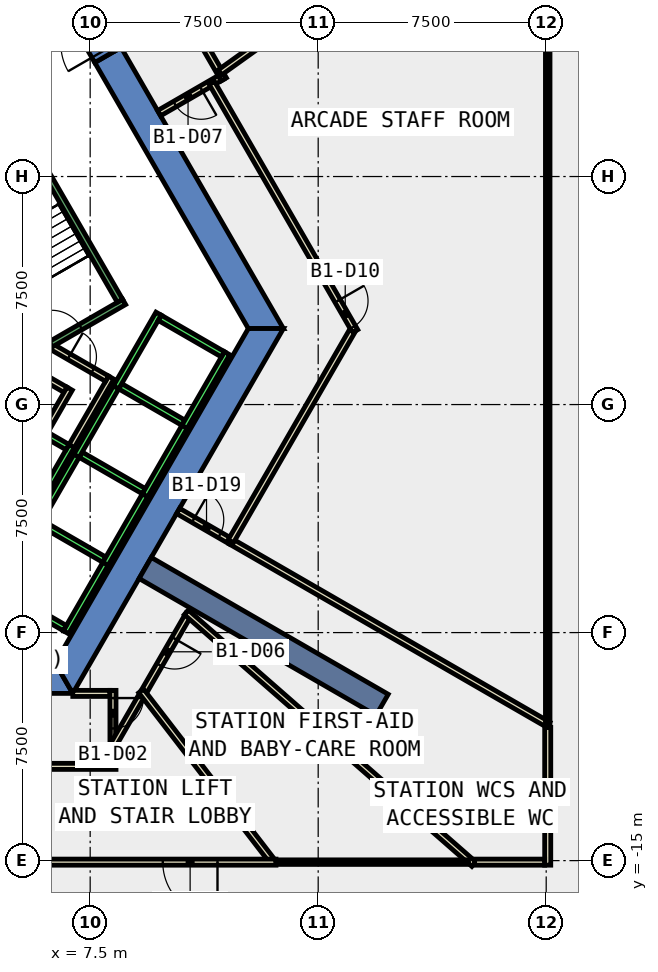
"""IFC4 building model, lengths in metres.
Left out: names, types, materials, properties, quantities, classifications, styles, units other than length and angle.
Written with IfcOpenShell. Run it as: python <this file> out.ifc"""

import sys

from ifc_helpers import new_model, si_unit, direction, frame, frame_2d, origin, place, context, subcontext, project, spatial, polyline, rectangle, outline, extrude, element, fill, save


model = new_model("IFC4")
c1 = context("Model", 3, precision=1e-05, world=origin(), true_north=direction((0.0, 1.0)))
c2 = subcontext(c1, "Body", "Model", "MODEL_VIEW")
j1 = project(units=[si_unit("LENGTHUNIT", "METRE"), si_unit("PLANEANGLEUNIT", "RADIAN")], contexts=[c1])
p1 = place(None, origin())
s1 = spatial("IfcSite", under=j1, at=p1, CompositionType="ELEMENT")
p2 = place(p1, origin())
s2 = spatial("IfcBuilding", under=s1, at=p2, CompositionType="ELEMENT")
p3 = place(p2, frame((0.0, 0.0, -5.5)))
s3 = spatial("IfcBuildingStorey", under=s2, at=p3, CompositionType="ELEMENT", Elevation=-5.5)
p4 = place(p3, frame((0.0, 0.0, -0.42)))
e1 = element("IfcWall", 1, at=p4, inside=s3, PredefinedType="SHEAR", context=c2, shape_type="SweptSolid", body=[
    extrude(outline(polyline([(8.517, 11.748), (7.651, 11.248), (12.702, 2.5), (13.856, 2.5), (8.517, 11.748)])), origin(), (0.0, 0.0, 1.0), 5.42),
])
p5 = place(p3, frame((0.0, 0.0, 3.6)))
e2 = element("IfcWall", 2, at=p5, inside=s3, PredefinedType="SHEAR", context=c2, shape_type="SweptSolid", body=[
    extrude(outline(polyline([(7.517, 13.48), (6.651, 12.98), (7.651, 11.248), (8.517, 11.748), (7.517, 13.48)])), origin(), (0.0, 0.0, 1.0), 1.4),
])
p6 = place(p3, frame((0.0, 0.0, -0.42)))
e3 = element("IfcWall", 3, at=p6, inside=s3, PredefinedType="SHEAR", context=c2, shape_type="SweptSolid", body=[
    extrude(outline(polyline([(5.75, -8.5), (5.75, -9.5), (6.928, -9.5), (6.351, -8.5), (5.75, -8.5)])), origin(), (0.0, 0.0, 1.0), 5.42),
])
p7 = place(p3, frame((0.0, 0.0, -0.42)))
e4 = element("IfcWall", 4, at=p7, inside=s3, PredefinedType="SHEAR", context=c2, shape_type="SweptSolid", body=[
    extrude(outline(polyline([(6.928, -9.5), (13.856, 2.5), (12.702, 2.5), (6.351, -8.5), (6.928, -9.5)])), origin(), (0.0, 0.0, 1.0), 5.42),
])
p8 = place(p3, frame((9.31, -5.375, -0.42), z_axis=(0.0, 0.0, 1.0), x_axis=(0.866017533419, -0.500013631625, 0.0)))
e5 = element("IfcWall", 5, at=p8, inside=s3, PredefinedType="SHEAR", context=c2, shape_type="SweptSolid", body=[
    extrude(rectangle(XDim=9.0, YDim=0.8, at=frame_2d((4.5, 0.0))), origin(), (0.0, 0.0, 1.0), 5.42),
])
p9 = place(p3, frame((6.928, -9.5, 0.0), z_axis=(0.0, 0.0, 1.0), x_axis=(1.0, 0.0, 0.0)))
e6 = element("IfcWall", 6, at=p9, inside=s3, PredefinedType="PARTITIONING", context=c2, shape_type="SweptSolid", body=[
    extrude(rectangle(XDim=1.222, YDim=0.2, at=frame_2d((0.611, 0.0))), origin(), (0.0, 0.0, 1.0), 4.9),
])
p10 = place(p3, frame((8.25, -9.4, 0.0), z_axis=(0.0, 0.0, 1.0), x_axis=(0.0, -1.0, 0.0)))
e7 = element("IfcWall", 7, at=p10, inside=s3, PredefinedType="PARTITIONING", context=c2, shape_type="SweptSolid", body=[
    extrude(rectangle(XDim=1.71, YDim=0.2, at=frame_2d((0.855, 0.0))), origin(), (0.0, 0.0, 1.0), 4.9),
])
p11 = place(p10, frame((0.253, 0.0, 0.0)))
e8 = element("IfcOpeningElement", 8, at=p11, cuts=e7, PredefinedType="OPENING", context=c2, shape_type="SweptSolid", body=[
    extrude(rectangle(XDim=1.0, YDim=2.1, at=frame_2d((0.5, 1.05))), frame((0.0, 0.11, 0.0), z_axis=(0.0, -1.0, 0.0), x_axis=(1.0, 0.0, 0.0)), (0.0, 0.0, 1.0), 0.22),
])
p12 = place(p3, frame((8.35, -11.9, 0.0), z_axis=(0.0, 0.0, 1.0), x_axis=(-1.0, 0.0, 0.0)))
e9 = element("IfcWall", 9, at=p12, inside=s3, PredefinedType="PARTITIONING", context=c2, shape_type="SweptSolid", body=[
    extrude(rectangle(XDim=7.039, YDim=0.2, at=frame_2d((3.52, 0.0))), origin(), (0.0, 0.0, 1.0), 4.9),
])
p13 = place(p12, frame((2.659, 0.0, 0.0)))
e10 = element("IfcOpeningElement", 10, at=p13, cuts=e9, PredefinedType="OPENING", context=c2, shape_type="SweptSolid", body=[
    extrude(rectangle(XDim=1.0, YDim=2.1, at=frame_2d((0.5, 1.05))), frame((0.0, 0.11, 0.0), z_axis=(0.0, -1.0, 0.0), x_axis=(1.0, 0.0, 0.0)), (0.0, 0.0, 1.0), 0.22),
])
p14 = place(p3, frame((8.25, -11.31, 0.0), z_axis=(0.0, 0.0, 1.0), x_axis=(0.0, -1.0, 0.0)))
e11 = element("IfcWall", 11, at=p14, inside=s3, PredefinedType="PARTITIONING", context=c2, shape_type="SweptSolid", body=[
    extrude(rectangle(XDim=0.49, YDim=0.2, at=frame_2d((0.245, 0.0))), origin(), (0.0, 0.0, 1.0), 4.9),
])
p15 = place(p3, frame((9.238, -9.498, 0.0), z_axis=(0.0, 0.0, 1.0), x_axis=(-0.499780113518, -0.866152318089, 0.0)))
e12 = element("IfcWall", 12, at=p15, inside=s3, PredefinedType="PARTITIONING", context=c2, shape_type="SweptSolid", body=[
    extrude(rectangle(XDim=2.077, YDim=0.2, at=frame_2d((1.039, 0.0))), origin(), (0.0, 0.0, 1.0), 4.9),
])
p16 = place(p3, frame((10.738, -6.901, 0.0), z_axis=(0.0, 0.0, 1.0), x_axis=(-0.500131122175, -0.865949687125, 0.0)))
e13 = element("IfcWall", 13, at=p16, inside=s3, PredefinedType="PARTITIONING", context=c2, shape_type="SweptSolid", body=[
    extrude(rectangle(XDim=2.999, YDim=0.2, at=frame_2d((1.5, 0.0))), origin(), (0.0, 0.0, 1.0), 4.9),
])
p17 = place(p16, frame((0.921, 0.0, 0.0)))
e14 = element("IfcOpeningElement", 14, at=p17, cuts=e13, PredefinedType="OPENING", context=c2, shape_type="SweptSolid", body=[
    extrude(rectangle(XDim=1.0, YDim=2.1, at=frame_2d((0.5, 1.05))), frame((0.0, 0.11, 0.0), z_axis=(0.0, -1.0, 0.0), x_axis=(1.0, 0.0, 0.0)), (0.0, 0.0, 1.0), 0.22),
])
p18 = place(p3, frame((9.177, -9.419, 0.0), z_axis=(0.0, 0.0, 1.0), x_axis=(0.610138829962, -0.792294521104, 0.0)))
e15 = element("IfcWall", 15, at=p18, inside=s3, PredefinedType="PARTITIONING", context=c2, shape_type="SweptSolid", body=[
    extrude(rectangle(XDim=7.082, YDim=0.2, at=frame_2d((3.541, 0.0))), origin(), (0.0, 0.0, 1.0), 4.9),
])
p19 = place(p3, frame((13.613, -15.05, 0.0), z_axis=(0.0, 0.0, 1.0), x_axis=(-1.0, 0.0, 0.0)))
e16 = element("IfcWall", 16, at=p19, inside=s3, PredefinedType="PARTITIONING", context=c2, shape_type="SweptSolid", body=[
    extrude(rectangle(XDim=11.994, YDim=0.2, at=frame_2d((5.997, 0.0))), origin(), (0.0, 0.0, 1.0), 4.9),
])
p20 = place(p19, frame((1.925, 0.0, 0.0)))
e17 = element("IfcOpeningElement", 17, at=p20, cuts=e16, PredefinedType="OPENING", context=c2, shape_type="SweptSolid", body=[
    extrude(rectangle(XDim=1.8, YDim=2.1, at=frame_2d((0.9, 1.05))), frame((0.0, 0.11, 0.0), z_axis=(0.0, -1.0, 0.0), x_axis=(1.0, 0.0, 0.0)), (0.0, 0.0, 1.0), 0.22),
])
p21 = place(p3, frame((10.663, -6.835, 0.0), z_axis=(0.0, 0.0, 1.0), x_axis=(0.752369729321, -0.658741064761, 0.0)))
e18 = element("IfcWall", 18, at=p21, inside=s3, PredefinedType="PARTITIONING", context=c2, shape_type="SweptSolid", body=[
    extrude(rectangle(XDim=12.571, YDim=0.2, at=frame_2d((6.286, 0.0))), origin(), (0.0, 0.0, 1.0), 4.9),
])
p22 = place(p3, frame((19.946, -15.05, 0.0), z_axis=(0.0, 0.0, 1.0), x_axis=(-1.0, 0.0, 0.0)))
e19 = element("IfcWall", 19, at=p22, inside=s3, PredefinedType="PARTITIONING", context=c2, shape_type="SweptSolid", body=[
    extrude(rectangle(XDim=6.333, YDim=0.15, at=frame_2d((3.167, 0.0))), origin(), (0.0, 0.0, 1.0), 4.9),
])
p23 = place(p3, frame((10.392, -3.5, 0.0), z_axis=(0.0, 0.0, 1.0), x_axis=(0.866010750942, -0.50002537861, 0.0)))
e20 = element("IfcWall", 20, at=p23, inside=s3, PredefinedType="PARTITIONING", context=c2, shape_type="SweptSolid", body=[
    extrude(rectangle(XDim=2.0, YDim=0.2, at=frame_2d((1.0, 0.0))), origin(), (0.0, 0.0, 1.0), 4.9),
])
p24 = place(p23, frame((0.58, 0.0, 0.0)))
e21 = element("IfcOpeningElement", 21, at=p24, cuts=e20, PredefinedType="OPENING", context=c2, shape_type="SweptSolid", body=[
    extrude(rectangle(XDim=1.0, YDim=2.1, at=frame_2d((0.5, 1.05))), frame((0.0, 0.11, 0.0), z_axis=(0.0, -1.0, 0.0), x_axis=(1.0, 0.0, 0.0)), (0.0, 0.0, 1.0), 0.22),
])
p25 = place(p3, frame((12.124, -4.5, 0.0), z_axis=(0.0, 0.0, 1.0), x_axis=(0.866066629319, -0.499928588481, 0.0)))
e22 = element("IfcWall", 22, at=p25, inside=s3, PredefinedType="PARTITIONING", context=c2, shape_type="SweptSolid", body=[
    extrude(rectangle(XDim=12.064, YDim=0.2, at=frame_2d((6.032, 0.0))), origin(), (0.0, 0.0, 1.0), 4.9),
])
p26 = place(p3, frame((22.55, -10.619, 0.0), z_axis=(0.0, 0.0, 1.0), x_axis=(0.0, -1.0, 0.0)))
e23 = element("IfcWall", 23, at=p26, inside=s3, PredefinedType="PARTITIONING", context=c2, shape_type="SweptSolid", body=[
    extrude(rectangle(XDim=4.531, YDim=0.2, at=frame_2d((2.266, 0.0))), origin(), (0.0, 0.0, 1.0), 4.9),
])
p27 = place(p3, frame((22.45, -15.05, 0.0), z_axis=(0.0, 0.0, 1.0), x_axis=(-1.0, 0.0, 0.0)))
e24 = element("IfcWall", 24, at=p27, inside=s3, PredefinedType="PARTITIONING", context=c2, shape_type="SweptSolid", body=[
    extrude(rectangle(XDim=2.304, YDim=0.2, at=frame_2d((1.152, 0.0))), origin(), (0.0, 0.0, 1.0), 4.9),
])
p28 = place(p3, frame((11.845, 10.783, 0.0), z_axis=(0.0, 0.0, 1.0), x_axis=(-0.865973769406, -0.500089422704, 0.0)))
e25 = element("IfcWall", 25, at=p28, inside=s3, PredefinedType="PARTITIONING", context=c2, shape_type="SweptSolid", body=[
    extrude(rectangle(XDim=2.399, YDim=0.2, at=frame_2d((1.2, 0.0))), origin(), (0.0, 0.0, 1.0), 4.9),
])
p29 = place(p28, frame((0.8, 0.0, 0.0)))
e26 = element("IfcOpeningElement", 26, at=p29, cuts=e25, PredefinedType="OPENING", context=c2, shape_type="SweptSolid", body=[
    extrude(rectangle(XDim=1.0, YDim=2.1, at=frame_2d((0.5, 1.05))), frame((0.0, 0.11, 0.0), z_axis=(0.0, -1.0, 0.0), x_axis=(1.0, 0.0, 0.0)), (0.0, 0.0, 1.0), 0.22),
])
p30 = place(p3, frame((8.295, 16.932, 0.0), z_axis=(0.0, 0.0, 1.0), x_axis=(0.499982693035, -0.866035395735, 0.0)))
e27 = element("IfcWall", 27, at=p30, inside=s3, PredefinedType="PARTITIONING", context=c2, shape_type="SweptSolid", body=[
    extrude(rectangle(XDim=7.2, YDim=0.2, at=frame_2d((3.6, 0.0))), origin(), (0.0, 0.0, 1.0), 4.9),
])
p31 = place(p30, frame((2.659, 0.0, 0.0)))
e28 = element("IfcOpeningElement", 28, at=p31, cuts=e27, PredefinedType="OPENING", context=c2, shape_type="SweptSolid", body=[
    extrude(rectangle(XDim=1.0, YDim=2.1, at=frame_2d((0.5, 1.05))), frame((0.0, 0.11, 0.0), z_axis=(0.0, -1.0, 0.0), x_axis=(1.0, 0.0, 0.0)), (0.0, 0.0, 1.0), 0.22),
])
p32 = place(p3, frame((11.499, 10.583, 0.0), z_axis=(0.0, 0.0, 1.0), x_axis=(0.499933044277, -0.866064057238, 0.0)))
e29 = element("IfcWall", 29, at=p32, inside=s3, PredefinedType="PARTITIONING", context=c2, shape_type="SweptSolid", body=[
    extrude(rectangle(XDim=9.433, YDim=0.2, at=frame_2d((4.717, 0.0))), origin(), (0.0, 0.0, 1.0), 4.9),
])
p33 = place(p32, frame((8.283, 0.0, 0.0)))
e30 = element("IfcOpeningElement", 30, at=p33, cuts=e29, PredefinedType="OPENING", context=c2, shape_type="SweptSolid", body=[
    extrude(rectangle(XDim=1.0, YDim=2.1, at=frame_2d((0.5, 1.05))), frame((0.0, 0.11, 0.0), z_axis=(0.0, -1.0, 0.0), x_axis=(1.0, 0.0, 0.0)), (0.0, 0.0, 1.0), 0.22),
])
p34 = place(p3, frame((16.115, 2.413, 0.0), z_axis=(0.0, 0.0, 1.0), x_axis=(-0.499971321283, -0.866041960816, 0.0)))
e31 = element("IfcWall", 31, at=p34, inside=s3, PredefinedType="PARTITIONING", context=c2, shape_type="SweptSolid", body=[
    extrude(rectangle(XDim=7.982, YDim=0.2, at=frame_2d((3.991, 0.0))), origin(), (0.0, 0.0, 1.0), 4.9),
])
p35 = place(p3, frame((22.57, 18.658, 0.0), z_axis=(0.0, 0.0, 1.0), x_axis=(-0.813097421088, -0.582127635334, 0.0)))
e32 = element("IfcWall", 32, at=p35, inside=s3, PredefinedType="PARTITIONING", context=c2, shape_type="SweptSolid", body=[
    extrude(rectangle(XDim=13.289, YDim=0.2, at=frame_2d((6.645, 0.0))), origin(), (0.0, 0.0, 1.0), 4.9),
])
p36 = place(p3, frame((22.55, 18.743, 0.0), z_axis=(0.0, 0.0, 1.0), x_axis=(0.0, -1.0, 0.0)))
e33 = element("IfcWall", 33, at=p36, inside=s3, PredefinedType="PARTITIONING", context=c2, shape_type="SweptSolid", body=[
    extrude(rectangle(XDim=29.362, YDim=0.15, at=frame_2d((14.681, 0.0))), origin(), (0.0, 0.0, 1.0), 4.9),
])
p37 = place(p3, frame((5.499, 1.172, 0.0), z_axis=(0.0, 0.0, 1.0), x_axis=(0.866333505267, -0.499465972466, 0.0)))
e34 = element("IfcWall", 34, at=p37, inside=s3, PredefinedType="PARTITIONING", context=c2, shape_type="SweptSolid", body=[
    extrude(rectangle(XDim=1.374, YDim=0.2, at=frame_2d((0.687, 0.0))), origin(), (0.0, 0.0, 1.0), 4.9),
])
p38 = place(p3, frame((6.826, 0.522, 0.0), z_axis=(0.0, 0.0, 1.0), x_axis=(-0.500016722714, -0.866015748706, 0.0)))
e35 = element("IfcWall", 35, at=p38, inside=s3, PredefinedType="PARTITIONING", context=c2, shape_type="SweptSolid", body=[
    extrude(rectangle(XDim=1.7, YDim=0.2, at=frame_2d((0.85, 0.0))), origin(), (0.0, 0.0, 1.0), 4.9),
])
p39 = place(p3, frame((8.192, 0.888, 0.0), z_axis=(0.0, 0.0, 1.0), x_axis=(-0.499940625693, -0.866059680843, 0.0)))
e36 = element("IfcWall", 36, at=p39, inside=s3, PredefinedType="PARTITIONING", context=c2, shape_type="SweptSolid", body=[
    extrude(rectangle(XDim=2.68, YDim=0.2, at=frame_2d((1.34, 0.0))), origin(), (0.0, 0.0, 1.0), 4.9),
])
p40 = place(p3, frame((6.25, 1.894, 0.0), z_axis=(0.0, 0.0, 1.0), x_axis=(0.866043184279, -0.499969202016, 0.0)))
e37 = element("IfcWall", 37, at=p40, inside=s3, PredefinedType="PARTITIONING", context=c2, shape_type="SweptSolid", body=[
    extrude(rectangle(XDim=2.084, YDim=0.2, at=frame_2d((1.042, 0.0))), origin(), (0.0, 0.0, 1.0), 4.9),
])
p41 = place(p40, frame((0.642, 0.0, 0.0)))
e38 = element("IfcOpeningElement", 38, at=p41, cuts=e37, PredefinedType="OPENING", context=c2, shape_type="SweptSolid", body=[
    extrude(rectangle(XDim=0.9, YDim=2.1, at=frame_2d((0.45, 1.05))), frame((0.0, 0.11, 0.0), z_axis=(0.0, -1.0, 0.0), x_axis=(1.0, 0.0, 0.0)), (0.0, 0.0, 1.0), 0.22),
])
p42 = place(p3, frame((5.492, -3.788, 0.0), z_axis=(0.0, 0.0, 1.0), x_axis=(0.500011755427, 0.866018616679, 0.0)))
e39 = element("IfcWall", 39, at=p42, inside=s3, PredefinedType="STANDARD", context=c2, shape_type="SweptSolid", body=[
    extrude(rectangle(XDim=2.8, YDim=0.2, at=frame_2d((1.4, 0.0))), origin(), (0.0, 0.0, 1.0), 4.9),
])
p43 = place(p3, frame((4.677, -0.2, 0.0), z_axis=(0.0, 0.0, 1.0), x_axis=(0.865973769406, -0.500089422704, 0.0)))
e40 = element("IfcWall", 40, at=p43, inside=s3, PredefinedType="STANDARD", context=c2, shape_type="SweptSolid", body=[
    extrude(rectangle(XDim=2.399, YDim=0.2, at=frame_2d((1.2, 0.0))), origin(), (0.0, 0.0, 1.0), 4.9),
])
p44 = place(p3, frame((6.703, -7.49, 0.0), z_axis=(0.0, 0.0, 1.0), x_axis=(0.500011755427, 0.866018616679, 0.0)))
e41 = element("IfcWall", 41, at=p44, inside=s3, PredefinedType="STANDARD", context=c2, shape_type="SweptSolid", body=[
    extrude(rectangle(XDim=2.8, YDim=0.2, at=frame_2d((1.4, 0.0))), origin(), (0.0, 0.0, 1.0), 3.6),
])
for number, where, z_axis, x_axis in (
    (42, (4.588, -6.153, 0.0), (0.0, 0.0, 1.0), (0.866, -0.5, 0.0)),
    (43, (5.888, -3.902, 0.0), (0.0, 0.0, 1.0), (0.866, -0.5, 0.0)),
):
    element("IfcWall", number, at=place(p3, frame(where, z_axis=z_axis, x_axis=x_axis)), inside=s3, PredefinedType="STANDARD", context=c2, shape_type="SweptSolid", body=[
        extrude(rectangle(XDim=2.4, YDim=0.2, at=frame_2d((1.2, 0.0))), origin(), (0.0, 0.0, 1.0), 3.6),
    ])
p45 = place(p3, frame((5.751, -3.938, 0.0), z_axis=(0.0, 0.0, 1.0), x_axis=(0.49994636267, 0.866056369097, 0.0)))
e44 = element("IfcWall", 44, at=p45, inside=s3, PredefinedType="STANDARD", context=c2, shape_type="SweptSolid", body=[
    extrude(rectangle(XDim=2.8, YDim=0.2, at=frame_2d((1.4, 0.0))), origin(), (0.0, 0.0, 1.0), 3.6),
])
p46 = place(p3, frame((8.003, -5.238, 0.0), z_axis=(0.0, 0.0, 1.0), x_axis=(0.500011755427, 0.866018616679, 0.0)))
e45 = element("IfcWall", 45, at=p46, inside=s3, PredefinedType="STANDARD", context=c2, shape_type="SweptSolid", body=[
    extrude(rectangle(XDim=2.8, YDim=0.2, at=frame_2d((1.4, 0.0))), origin(), (0.0, 0.0, 1.0), 3.6),
])
p47 = place(p3, frame((7.188, -1.65, 0.0), z_axis=(0.0, 0.0, 1.0), x_axis=(0.865955154139, -0.50012165622, 0.0)))
e46 = element("IfcWall", 46, at=p47, inside=s3, PredefinedType="STANDARD", context=c2, shape_type="SweptSolid", body=[
    extrude(rectangle(XDim=2.4, YDim=0.2, at=frame_2d((1.2, 0.0))), origin(), (0.0, 0.0, 1.0), 3.6),
])
for number, where, z_axis, x_axis in (
    (47, (7.051, -1.687, 0.0), (0.0, 0.0, 1.0), (0.5, 0.866, 0.0)),
    (48, (9.303, -2.987, 0.0), (0.0, 0.0, 1.0), (0.5, 0.866, 0.0)),
):
    element("IfcWall", number, at=place(p3, frame(where, z_axis=z_axis, x_axis=x_axis)), inside=s3, PredefinedType="STANDARD", context=c2, shape_type="SweptSolid", body=[
        extrude(rectangle(XDim=2.8, YDim=0.2, at=frame_2d((1.4, 0.0))), origin(), (0.0, 0.0, 1.0), 3.6),
    ])
p48 = place(p3, frame((8.488, 0.602, 0.0), z_axis=(0.0, 0.0, 1.0), x_axis=(0.865973769406, -0.500089422704, 0.0)))
e49 = element("IfcWall", 49, at=p48, inside=s3, PredefinedType="STANDARD", context=c2, shape_type="SweptSolid", body=[
    extrude(rectangle(XDim=2.399, YDim=0.2, at=frame_2d((1.2, 0.0))), origin(), (0.0, 0.0, 1.0), 3.6),
])
for number, where, z_axis, x_axis in (
    (50, (8.351, 0.565, 0.0), (0.0, 0.0, 1.0), (0.5, 0.866, 0.0)),
    (51, (10.603, -0.735, 0.0), (0.0, 0.0, 1.0), (0.5, 0.866, 0.0)),
):
    element("IfcWall", number, at=place(p3, frame(where, z_axis=z_axis, x_axis=x_axis)), inside=s3, PredefinedType="STANDARD", context=c2, shape_type="SweptSolid", body=[
        extrude(rectangle(XDim=2.8, YDim=0.2, at=frame_2d((1.4, 0.0))), origin(), (0.0, 0.0, 1.0), 3.6),
    ])
p49 = place(p3, frame((9.788, 2.853, 0.0), z_axis=(0.0, 0.0, 1.0), x_axis=(0.865973769406, -0.500089422704, 0.0)))
e52 = element("IfcWall", 52, at=p49, inside=s3, PredefinedType="STANDARD", context=c2, shape_type="SweptSolid", body=[
    extrude(rectangle(XDim=2.399, YDim=0.2, at=frame_2d((1.2, 0.0))), origin(), (0.0, 0.0, 1.0), 3.6),
])
p50 = place(p3, frame((4.806, 1.176, 0.0), z_axis=(0.0, 0.0, 1.0), x_axis=(0.866059941101, 0.499940174841, 0.0)))
e53 = element("IfcWall", 53, at=p50, inside=s3, PredefinedType="STANDARD", context=c2, shape_type="SweptSolid", body=[
    extrude(rectangle(XDim=4.4, YDim=0.2, at=frame_2d((2.2, 0.0))), origin(), (0.0, 0.0, 1.0), 4.9),
])
p51 = place(p50, frame((1.65, 0.0, 0.0)))
e54 = element("IfcOpeningElement", 54, at=p51, cuts=e53, PredefinedType="OPENING", context=c2, shape_type="SweptSolid", body=[
    extrude(rectangle(XDim=1.1, YDim=2.2, at=frame_2d((0.55, 1.1))), frame((0.0, 0.11, 0.0), z_axis=(0.0, -1.0, 0.0), x_axis=(1.0, 0.0, 0.0)), (0.0, 0.0, 1.0), 0.22),
])
p52 = place(p3, frame((8.48, 3.412, 0.0), z_axis=(0.0, 0.0, 1.0), x_axis=(-0.499978703459, 0.866037698999, 0.0)))
e55 = element("IfcWall", 55, at=p52, inside=s3, PredefinedType="STANDARD", context=c2, shape_type="SweptSolid", body=[
    extrude(rectangle(XDim=6.9, YDim=0.2, at=frame_2d((3.45, 0.0))), origin(), (0.0, 0.0, 1.0), 4.9),
])
p53 = place(p11, origin())
e56 = element("IfcDoor", 56, at=p53, inside=s3, OperationType="SINGLE_SWING_RIGHT", PredefinedType="DOOR", context=c2, shape_type="SweptSolid", body=[
    extrude(rectangle(XDim=1.0, YDim=2.1, at=frame_2d((0.5, 1.05))), frame((0.0, 0.025, 0.0), z_axis=(0.0, -1.0, 0.0), x_axis=(1.0, 0.0, 0.0)), (0.0, 0.0, 1.0), 0.05),
])
fill(e8, e56)
p54 = place(p17, origin())
e57 = element("IfcDoor", 57, at=p54, inside=s3, OperationType="SINGLE_SWING_RIGHT", PredefinedType="DOOR", context=c2, shape_type="SweptSolid", body=[
    extrude(rectangle(XDim=1.0, YDim=2.1, at=frame_2d((0.5, 1.05))), frame((0.0, 0.025, 0.0), z_axis=(0.0, -1.0, 0.0), x_axis=(1.0, 0.0, 0.0)), (0.0, 0.0, 1.0), 0.05),
])
fill(e14, e57)
p55 = place(p29, origin())
e58 = element("IfcDoor", 58, at=p55, inside=s3, OperationType="SINGLE_SWING_LEFT", PredefinedType="DOOR", context=c2, shape_type="SweptSolid", body=[
    extrude(rectangle(XDim=1.0, YDim=2.1, at=frame_2d((0.5, 1.05))), frame((0.0, 0.025, 0.0), z_axis=(0.0, -1.0, 0.0), x_axis=(1.0, 0.0, 0.0)), (0.0, 0.0, 1.0), 0.05),
])
fill(e26, e58)
p56 = place(p33, origin())
e59 = element("IfcDoor", 59, at=p56, inside=s3, OperationType="SINGLE_SWING_RIGHT", PredefinedType="DOOR", context=c2, shape_type="SweptSolid", body=[
    extrude(rectangle(XDim=1.0, YDim=2.1, at=frame_2d((0.5, 1.05))), frame((0.0, 0.025, 0.0), z_axis=(0.0, -1.0, 0.0), x_axis=(1.0, 0.0, 0.0)), (0.0, 0.0, 1.0), 0.05),
])
fill(e30, e59)
p57 = place(p24, origin())
e60 = element("IfcDoor", 60, at=p57, inside=s3, OperationType="SINGLE_SWING_LEFT", PredefinedType="DOOR", context=c2, shape_type="SweptSolid", body=[
    extrude(rectangle(XDim=1.0, YDim=2.1, at=frame_2d((0.5, 1.05))), frame((0.0, 0.025, 0.0), z_axis=(0.0, -1.0, 0.0), x_axis=(1.0, 0.0, 0.0)), (0.0, 0.0, 1.0), 0.05),
])
fill(e21, e60)
p58 = place(p20, origin())
e61 = element("IfcDoor", 61, at=p58, inside=s3, OperationType="DOUBLE_DOOR_SINGLE_SWING", PredefinedType="DOOR", context=c2, shape_type="SweptSolid", body=[
    extrude(rectangle(XDim=1.8, YDim=2.1, at=frame_2d((0.9, 1.05))), frame((0.0, 0.025, 0.0), z_axis=(0.0, -1.0, 0.0), x_axis=(1.0, 0.0, 0.0)), (0.0, 0.0, 1.0), 0.05),
])
fill(e17, e61)
p59 = place(p41, origin())
e62 = element("IfcDoor", 62, at=p59, inside=s3, OperationType="SINGLE_SWING_LEFT", PredefinedType="DOOR", context=c2, shape_type="SweptSolid", body=[
    extrude(rectangle(XDim=0.9, YDim=2.1, at=frame_2d((0.45, 1.05))), frame((0.0, 0.025, 0.0), z_axis=(0.0, -1.0, 0.0), x_axis=(1.0, 0.0, 0.0)), (0.0, 0.0, 1.0), 0.05),
])
fill(e38, e62)
p60 = place(p51, origin())
e63 = element("IfcDoor", 63, at=p60, inside=s3, OperationType="SINGLE_SWING_LEFT", PredefinedType="DOOR", context=c2, shape_type="SweptSolid", body=[
    extrude(rectangle(XDim=1.1, YDim=2.2, at=frame_2d((0.55, 1.1))), frame((0.0, 0.025, 0.0), z_axis=(0.0, -1.0, 0.0), x_axis=(1.0, 0.0, 0.0)), (0.0, 0.0, 1.0), 0.05),
])
fill(e54, e63)
save(model, sys.argv[1])
